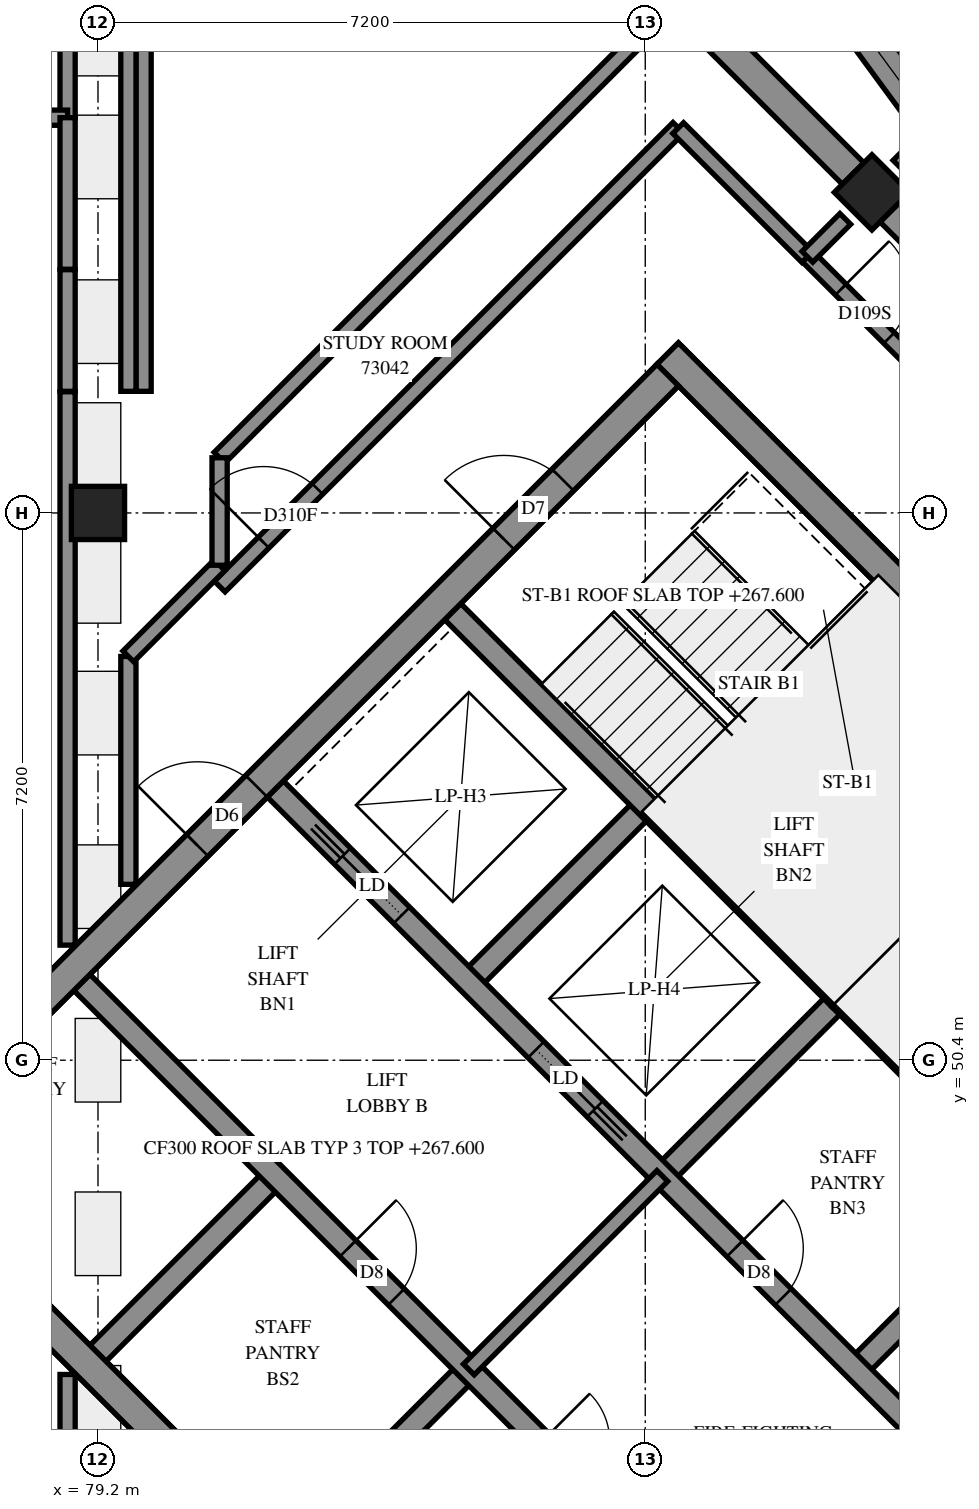
"""IFC4 building model, lengths in metres.
Left out: names, types, materials, properties, quantities, classifications, styles, units other than length and angle.
Written with IfcOpenShell. Run it as: python <this file> out.ifc"""

import sys

from ifc_helpers import new_model, si_unit, direction, frame, frame_2d, origin, origin_2d, place, context, subcontext, project, spatial, polyline, rectangle, outline, extrude, element, fill, save


model = new_model("IFC4")
c1 = context("Model", 3, precision=1e-05, world=origin(), true_north=direction((0.0, 1.0)))
c2 = subcontext(c1, "Body", "Model", "MODEL_VIEW")
j1 = project(units=[si_unit("LENGTHUNIT", "METRE"), si_unit("PLANEANGLEUNIT", "RADIAN")], contexts=[c1])
p1 = place(None, origin())
s1 = spatial("IfcSite", under=j1, at=p1, CompositionType="ELEMENT")
p2 = place(p1, origin())
s2 = spatial("IfcBuilding", under=s1, at=p2, CompositionType="ELEMENT")
p3 = place(p2, frame((0.0, 0.0, 267.6)))
s3 = spatial("IfcBuildingStorey", under=s2, at=p3, CompositionType="ELEMENT", Elevation=267.6)
for number, where, z_axis, x_axis in (
    (1, (79.2, 57.6, 0.0), (0.0, 0.0, 1.0), (1.0, 0.0, 0.0)),
    (2, (89.382, 61.818, 0.0), (0.0, 0.0, 1.0), (0.707, -0.707, 0.0)),
):
    element("IfcColumn", number, at=place(p3, frame(where, z_axis=z_axis, x_axis=x_axis)), inside=s3, PredefinedType="COLUMN", context=c2, shape_type="SweptSolid", body=[
        extrude(rectangle(XDim=0.7, YDim=0.7, at=origin_2d()), origin(), (0.0, 0.0, 1.0), 3.1),
    ])
p4 = place(p3, frame((76.23, 49.231, -0.3), z_axis=(0.0, 0.0, 1.0), x_axis=(0.7071034917, -0.7071100706, 0.0)))
e3 = element("IfcWall", 3, at=p4, inside=s3, PredefinedType="SHEAR", context=c2, shape_type="SweptSolid", body=[
    extrude(rectangle(XDim=15.2, YDim=0.4, at=frame_2d((7.6, 0.0))), origin(), (0.0, 0.0, 1.0), 2.7),
])
p5 = place(p3, frame((86.695, 59.696, -0.3), z_axis=(0.0, 0.0, 1.0), x_axis=(0.7071100706, -0.7071034917, 0.0)))
e4 = element("IfcWall", 4, at=p5, inside=s3, PredefinedType="SHEAR", context=c2, shape_type="SweptSolid", body=[
    extrude(rectangle(XDim=15.2, YDim=0.4, at=frame_2d((7.6, 0.0))), origin(), (0.0, 0.0, 1.0), 2.7),
])
p6 = place(p5, frame((10.4, 0.0, 0.3)))
e5 = element("IfcOpeningElement", 5, at=p6, cuts=e4, PredefinedType="OPENING", context=c2, shape_type="SweptSolid", body=[
    extrude(rectangle(XDim=0.8, YDim=2.1, at=frame_2d((0.4, 1.05))), frame((0.0, 0.21, 0.0), z_axis=(0.0, -1.0, 0.0), x_axis=(1.0, 0.0, 0.0)), (0.0, 0.0, 1.0), 0.42),
])
p7 = place(p3, frame((76.513, 49.231, -0.3), z_axis=(0.0, 0.0, 1.0), x_axis=(0.7071067812, 0.7071067812, 0.0)))
e6 = element("IfcWall", 6, at=p7, inside=s3, PredefinedType="SHEAR", context=c2, shape_type="SweptSolid", body=[
    extrude(rectangle(XDim=14.4, YDim=0.4, at=frame_2d((7.2, 0.0))), origin(), (0.0, 0.0, 1.0), 2.7),
])
p8 = place(p7, frame((5.65, 0.0, 0.3)))
e7 = element("IfcOpeningElement", 7, at=p8, cuts=e6, PredefinedType="OPENING", context=c2, shape_type="SweptSolid", body=[
    extrude(rectangle(XDim=1.1, YDim=2.1, at=frame_2d((0.55, 1.05))), frame((0.0, 0.21, 0.0), z_axis=(0.0, -1.0, 0.0), x_axis=(1.0, 0.0, 0.0)), (0.0, 0.0, 1.0), 0.42),
])
p9 = place(p7, frame((11.35, 0.0, 0.3)))
e8 = element("IfcOpeningElement", 8, at=p9, cuts=e6, PredefinedType="OPENING", context=c2, shape_type="SweptSolid", body=[
    extrude(rectangle(XDim=1.1, YDim=2.1, at=frame_2d((0.55, 1.05))), frame((0.0, 0.21, 0.0), z_axis=(0.0, -1.0, 0.0), x_axis=(1.0, 0.0, 0.0)), (0.0, 0.0, 1.0), 0.42),
])
p10 = place(p7, frame((0.25, 0.0, 0.0)))
e9 = element("IfcOpeningElement", 9, at=p10, cuts=e6, PredefinedType="OPENING", context=c2, shape_type="SweptSolid", body=[
    extrude(rectangle(XDim=0.9, YDim=2.1, at=frame_2d((0.45, 1.05))), frame((0.0, 0.21, 0.0), z_axis=(0.0, -1.0, 0.0), x_axis=(1.0, 0.0, 0.0)), (0.0, 0.0, 1.0), 0.42),
])
p11 = place(p3, frame((86.978, 38.766, -0.3), z_axis=(0.0, 0.0, 1.0), x_axis=(0.7071067812, 0.7071067812, 0.0)))
e10 = element("IfcWall", 10, at=p11, inside=s3, PredefinedType="SHEAR", context=c2, shape_type="SweptSolid", body=[
    extrude(rectangle(XDim=14.4, YDim=0.4, at=frame_2d((7.2, 0.0))), origin(), (0.0, 0.0, 1.0), 2.7),
])
p12 = place(p11, frame((4.55, 0.0, 0.3)))
e11 = element("IfcOpeningElement", 11, at=p12, cuts=e10, PredefinedType="OPENING", context=c2, shape_type="SweptSolid", body=[
    extrude(rectangle(XDim=1.1, YDim=2.1, at=frame_2d((0.55, 1.05))), frame((0.0, 0.21, 0.0), z_axis=(0.0, -1.0, 0.0), x_axis=(1.0, 0.0, 0.0)), (0.0, 0.0, 1.0), 0.42),
])
p13 = place(p11, frame((11.35, 0.0, 0.3)))
e12 = element("IfcOpeningElement", 12, at=p13, cuts=e10, PredefinedType="OPENING", context=c2, shape_type="SweptSolid", body=[
    extrude(rectangle(XDim=1.1, YDim=2.1, at=frame_2d((0.55, 1.05))), frame((0.0, 0.21, 0.0), z_axis=(0.0, -1.0, 0.0), x_axis=(1.0, 0.0, 0.0)), (0.0, 0.0, 1.0), 0.42),
])
for number, where, z_axis, x_axis in (
    (13, (79.2, 46.544, 0.0), (0.0, 0.0, 1.0), (0.707, 0.707, 0.0)),
    (14, (84.079, 51.423, 0.0), (0.0, 0.0, 1.0), (0.707, 0.707, 0.0)),
):
    element("IfcWall", number, at=place(p3, frame(where, z_axis=z_axis, x_axis=x_axis)), inside=s3, PredefinedType="SOLIDWALL", context=c2, shape_type="SweptSolid", body=[
        extrude(rectangle(XDim=3.3, YDim=0.3, at=frame_2d((1.65, 0.0))), origin(), (0.0, 0.0, 1.0), 3.1),
    ])
p14 = place(p3, frame((81.746, 43.999, 0.0), z_axis=(0.0, 0.0, 1.0), x_axis=(0.7071067812, 0.7071067812, 0.0)))
e15 = element("IfcWall", 15, at=p14, inside=s3, PredefinedType="SOLIDWALL", context=c2, shape_type="SweptSolid", body=[
    extrude(rectangle(XDim=3.3, YDim=0.3, at=frame_2d((1.65, 0.0))), origin(), (0.0, 0.0, 1.0), 3.1),
])
for number, where, z_axis, x_axis in (
    (16, (86.625, 48.878, 0.0), (0.0, 0.0, 1.0), (0.707, 0.707, 0.0)),
    (17, (89.17, 46.332, 0.0), (0.0, 0.0, 1.0), (0.707, 0.707, 0.0)),
):
    element("IfcWall", number, at=place(p3, frame(where, z_axis=z_axis, x_axis=x_axis)), inside=s3, PredefinedType="SOLIDWALL", context=c2, shape_type="SweptSolid", body=[
        extrude(rectangle(XDim=3.3, YDim=0.3, at=frame_2d((1.65, 0.0))), origin(), (0.0, 0.0, 1.0), 3.1),
    ])
p15 = place(p3, frame((78.988, 51.423, 0.0), z_axis=(0.0, 0.0, 1.0), x_axis=(0.7071067812, -0.7071067812, 0.0)))
e18 = element("IfcWall", 18, at=p15, inside=s3, PredefinedType="SOLIDWALL", context=c2, shape_type="SweptSolid", body=[
    extrude(rectangle(XDim=14.4, YDim=0.3, at=frame_2d((7.2, 0.0))), origin(), (0.0, 0.0, 1.0), 3.1),
])
p16 = place(p15, frame((4.95, 0.0, 0.0)))
e19 = element("IfcOpeningElement", 19, at=p16, cuts=e18, PredefinedType="OPENING", context=c2, shape_type="SweptSolid", body=[
    extrude(rectangle(XDim=0.9, YDim=2.1, at=frame_2d((0.45, 1.05))), frame((0.0, 0.16, 0.0), z_axis=(0.0, -1.0, 0.0), x_axis=(1.0, 0.0, 0.0)), (0.0, 0.0, 1.0), 0.32),
])
p17 = place(p15, frame((8.55, 0.0, 0.0)))
e20 = element("IfcOpeningElement", 20, at=p17, cuts=e18, PredefinedType="OPENING", context=c2, shape_type="SweptSolid", body=[
    extrude(rectangle(XDim=0.9, YDim=2.1, at=frame_2d((0.45, 1.05))), frame((0.0, 0.16, 0.0), z_axis=(0.0, -1.0, 0.0), x_axis=(1.0, 0.0, 0.0)), (0.0, 0.0, 1.0), 0.32),
])
p18 = place(p15, frame((12.05, 0.0, 0.0)))
e21 = element("IfcOpeningElement", 21, at=p18, cuts=e18, PredefinedType="OPENING", context=c2, shape_type="SweptSolid", body=[
    extrude(rectangle(XDim=1.1, YDim=2.1, at=frame_2d((0.55, 1.05))), frame((0.0, 0.16, 0.0), z_axis=(0.0, -1.0, 0.0), x_axis=(1.0, 0.0, 0.0)), (0.0, 0.0, 1.0), 0.32),
])
p19 = place(p3, frame((81.534, 53.969, 0.0), z_axis=(0.0, 0.0, 1.0), x_axis=(0.707103309, -0.7071102534, 0.0)))
e22 = element("IfcWall", 22, at=p19, inside=s3, PredefinedType="SOLIDWALL", context=c2, shape_type="SweptSolid", body=[
    extrude(rectangle(XDim=14.4, YDim=0.3, at=frame_2d((7.2, 0.0))), origin(), (0.0, 0.0, 1.0), 3.1),
])
p20 = place(p19, frame((8.55, 0.0, 0.0)))
e23 = element("IfcOpeningElement", 23, at=p20, cuts=e22, PredefinedType="OPENING", context=c2, shape_type="SweptSolid", body=[
    extrude(rectangle(XDim=0.9, YDim=2.1, at=frame_2d((0.45, 1.05))), frame((0.0, 0.16, 0.0), z_axis=(0.0, -1.0, 0.0), x_axis=(1.0, 0.0, 0.0)), (0.0, 0.0, 1.0), 0.32),
])
p21 = place(p19, frame((1.25, 0.0, 0.0)))
e24 = element("IfcOpeningElement", 24, at=p21, cuts=e22, PredefinedType="OPENING", context=c2, shape_type="SweptSolid", body=[
    extrude(rectangle(XDim=1.1, YDim=2.1, at=frame_2d((0.55, 1.05))), frame((0.0, 0.16, 0.0), z_axis=(0.0, -1.0, 0.0), x_axis=(1.0, 0.0, 0.0)), (0.0, 0.0, 1.0), 0.32),
])
p22 = place(p19, frame((4.85, 0.0, 0.0)))
e25 = element("IfcOpeningElement", 25, at=p22, cuts=e22, PredefinedType="OPENING", context=c2, shape_type="SweptSolid", body=[
    extrude(rectangle(XDim=1.1, YDim=2.1, at=frame_2d((0.55, 1.05))), frame((0.0, 0.16, 0.0), z_axis=(0.0, -1.0, 0.0), x_axis=(1.0, 0.0, 0.0)), (0.0, 0.0, 1.0), 0.32),
])
p23 = place(p19, frame((12.05, 0.0, 0.0)))
e26 = element("IfcOpeningElement", 26, at=p23, cuts=e22, PredefinedType="OPENING", context=c2, shape_type="SweptSolid", body=[
    extrude(rectangle(XDim=1.1, YDim=2.1, at=frame_2d((0.55, 1.05))), frame((0.0, 0.16, 0.0), z_axis=(0.0, -1.0, 0.0), x_axis=(1.0, 0.0, 0.0)), (0.0, 0.0, 1.0), 0.32),
])
for number, where, z_axis, x_axis in (
    (27, (83.867, 56.302, 0.0), (0.0, 0.0, 1.0), (0.707, -0.707, 0.0)),
    (28, (88.958, 51.211, 0.0), (0.0, 0.0, 1.0), (0.707, -0.707, 0.0)),
):
    element("IfcWall", number, at=place(p3, frame(where, z_axis=z_axis, x_axis=x_axis)), inside=s3, PredefinedType="SOLIDWALL", context=c2, shape_type="SweptSolid", body=[
        extrude(rectangle(XDim=7.2, YDim=0.3, at=frame_2d((3.6, 0.0))), origin(), (0.0, 0.0, 1.0), 3.1),
    ])
p24 = place(p3, frame((88.958, 51.211, 0.0), z_axis=(0.0, 0.0, 1.0), x_axis=(0.7071067812, 0.7071067812, 0.0)))
e29 = element("IfcWall", 29, at=p24, inside=s3, PredefinedType="SOLIDWALL", context=c2, shape_type="SweptSolid", body=[
    extrude(rectangle(XDim=4.2, YDim=0.3, at=frame_2d((2.1, 0.0))), origin(), (0.0, 0.0, 1.0), 3.1),
])
p25 = place(p3, frame((91.004, 61.571, 0.0), z_axis=(0.0, 0.0, 1.0), x_axis=(-0.5916423825, 0.806200528, 0.0)))
e30 = element("IfcWall", 30, at=p25, inside=s3, PredefinedType="SOLIDWALL", context=c2, shape_type="SweptSolid", body=[
    extrude(outline(polyline([(0.035, -0.225), (3.409, -0.225), (3.34, 0.225), (-0.035, 0.225), (0.035, -0.225)])), origin(), (0.0, 0.0, 1.0), 3.1),
])
p26 = place(p25, frame((1.639, 0.0, 0.45)))
e31 = element("IfcOpeningElement", 31, at=p26, cuts=e30, PredefinedType="OPENING", context=c2, shape_type="SweptSolid", body=[
    extrude(rectangle(XDim=1.2, YDim=2.55, at=frame_2d((0.6, 1.275))), frame((0.0, 0.235, 0.0), z_axis=(0.0, -1.0, 0.0), x_axis=(1.0, 0.0, 0.0)), (0.0, 0.0, 1.0), 0.47),
])
p27 = place(p3, frame((84.079, 46.332, 0.0), z_axis=(0.0, 0.0, 1.0), x_axis=(0.7071067812, 0.7071067812, 0.0)))
e32 = element("IfcWall", 32, at=p27, inside=s3, PredefinedType="PARTITIONING", context=c2, shape_type="SweptSolid", body=[
    extrude(rectangle(XDim=3.6, YDim=0.2, at=frame_2d((1.8, 0.0))), origin(), (0.0, 0.0, 1.0), 3.1),
])
p28 = place(p3, frame((79.8, 59.2, 0.0), z_axis=(0.0, 0.0, 1.0), x_axis=(0.0, 1.0, 0.0)))
e33 = element("IfcWall", 33, at=p28, inside=s3, PredefinedType="PARTITIONING", context=c2, shape_type="SweptSolid", body=[
    extrude(rectangle(XDim=13.8, YDim=0.2, at=frame_2d((6.9, 0.0))), origin(), (0.0, 0.0, 1.0), 3.1),
])
p29 = place(p3, frame((79.6, 59.2, 0.0), z_axis=(0.0, 0.0, 1.0), x_axis=(0.0, 1.0, 0.0)))
e34 = element("IfcWall", 34, at=p29, inside=s3, PredefinedType="PARTITIONING", context=c2, shape_type="SweptSolid", body=[
    extrude(rectangle(XDim=12.8, YDim=0.2, at=frame_2d((6.4, 0.0))), origin(), (0.0, 0.0, 1.0), 3.1),
])
p30 = place(p3, frame((80.799, 58.327, 0.0), z_axis=(0.0, 0.0, 1.0), x_axis=(0.7071120163, 0.707101546, 0.0)))
e35 = element("IfcWall", 35, at=p30, inside=s3, PredefinedType="PARTITIONING", context=c2, shape_type="SweptSolid", body=[
    extrude(rectangle(XDim=9.551, YDim=0.2, at=frame_2d((4.775, 0.0))), origin(), (0.0, 0.0, 1.0), 3.1),
])
p31 = place(p3, frame((78.8, 62.8, 0.0), z_axis=(0.0, 0.0, 1.0), x_axis=(0.0, 1.0, 0.0)))
e36 = element("IfcWall", 36, at=p31, inside=s3, PredefinedType="PARTITIONING", context=c2, shape_type="SweptSolid", body=[
    extrude(rectangle(XDim=9.2, YDim=0.2, at=frame_2d((4.6, 0.0))), origin(), (0.0, 0.0, 1.0), 3.1),
])
p32 = place(p3, frame((80.802, 56.633, 0.0), z_axis=(0.0, 0.0, 1.0), x_axis=(0.7071067812, 0.7071067812, 0.0)))
e37 = element("IfcWall", 37, at=p32, inside=s3, PredefinedType="PARTITIONING", context=c2, shape_type="SweptSolid", body=[
    extrude(rectangle(XDim=8.533, YDim=0.2, at=frame_2d((4.267, 0.0))), origin(), (0.0, 0.0, 1.0), 3.1),
])
p33 = place(p32, frame((0.817, 0.0, 0.0)))
e38 = element("IfcOpeningElement", 38, at=p33, cuts=e37, PredefinedType="OPENING", context=c2, shape_type="SweptSolid", body=[
    extrude(rectangle(XDim=1.0, YDim=2.1, at=frame_2d((0.5, 1.05))), frame((0.0, 0.11, 0.0), z_axis=(0.0, -1.0, 0.0), x_axis=(1.0, 0.0, 0.0)), (0.0, 0.0, 1.0), 0.22),
])
p34 = place(p3, frame((78.8, 51.914, 0.0), z_axis=(0.0, 0.0, 1.0), x_axis=(0.0, 1.0, 0.0)))
e39 = element("IfcWall", 39, at=p34, inside=s3, PredefinedType="PARTITIONING", context=c2, shape_type="SweptSolid", body=[
    extrude(rectangle(XDim=7.28, YDim=0.2, at=frame_2d((3.64, 0.0))), origin(), (0.0, 0.0, 1.0), 3.1),
])
p35 = place(p3, frame((88.537, 60.973, 0.0), z_axis=(0.0, 0.0, 1.0), x_axis=(0.7071067812, -0.7071067812, 0.0)))
e40 = element("IfcWall", 40, at=p35, inside=s3, PredefinedType="PARTITIONING", context=c2, shape_type="SweptSolid", body=[
    extrude(rectangle(XDim=6.401, YDim=0.2, at=frame_2d((3.2, 0.0))), origin(), (0.0, 0.0, 1.0), 3.1),
])
p36 = place(p35, frame((0.615, 0.0, 0.0)))
e41 = element("IfcOpeningElement", 41, at=p36, cuts=e40, PredefinedType="OPENING", context=c2, shape_type="SweptSolid", body=[
    extrude(rectangle(XDim=0.9, YDim=2.1, at=frame_2d((0.45, 1.05))), frame((0.0, 0.11, 0.0), z_axis=(0.0, -1.0, 0.0), x_axis=(1.0, 0.0, 0.0)), (0.0, 0.0, 1.0), 0.22),
])
p37 = place(p3, frame((74.402, 62.8, 0.0), z_axis=(0.0, 0.0, 1.0), x_axis=(1.0, 0.0, 0.0)))
e42 = element("IfcWall", 42, at=p37, inside=s3, PredefinedType="PARTITIONING", context=c2, shape_type="SweptSolid", body=[
    extrude(rectangle(XDim=4.398, YDim=0.2, at=frame_2d((2.199, 0.0))), origin(), (0.0, 0.0, 1.0), 3.1),
])
p38 = place(p37, frame((1.94, 0.0, 0.0)))
e43 = element("IfcOpeningElement", 43, at=p38, cuts=e42, PredefinedType="OPENING", context=c2, shape_type="SweptSolid", body=[
    extrude(rectangle(XDim=1.0, YDim=2.1, at=frame_2d((0.5, 1.05))), frame((0.0, 0.11, 0.0), z_axis=(0.0, -1.0, 0.0), x_axis=(1.0, 0.0, 0.0)), (0.0, 0.0, 1.0), 0.22),
])
p39 = place(p3, frame((79.6, 52.714, 0.0), z_axis=(0.0, 0.0, 1.0), x_axis=(0.0, 1.0, 0.0)))
e44 = element("IfcWall", 44, at=p39, inside=s3, PredefinedType="PARTITIONING", context=c2, shape_type="SweptSolid", body=[
    extrude(rectangle(XDim=2.998, YDim=0.2, at=frame_2d((1.499, 0.0))), origin(), (0.0, 0.0, 1.0), 3.1),
])
p40 = place(p3, frame((86.833, 62.663, 0.0), z_axis=(0.0, 0.0, 1.0), x_axis=(0.7075233388, -0.706689978, 0.0)))
e45 = element("IfcWall", 45, at=p40, inside=s3, PredefinedType="PARTITIONING", context=c2, shape_type="SweptSolid", body=[
    extrude(rectangle(XDim=2.4, YDim=0.2, at=frame_2d((1.2, 0.0))), origin(), (0.0, 0.0, 1.0), 3.1),
])
p41 = place(p3, frame((78.8, 60.806, 0.0), z_axis=(0.0, 0.0, 1.0), x_axis=(0.0, 1.0, 0.0)))
e46 = element("IfcWall", 46, at=p41, inside=s3, PredefinedType="PARTITIONING", context=c2, shape_type="SweptSolid", body=[
    extrude(rectangle(XDim=1.994, YDim=0.2, at=frame_2d((0.997, 0.0))), origin(), (0.0, 0.0, 1.0), 3.1),
])
p42 = place(p3, frame((78.8, 44.45, 0.0), z_axis=(0.0, 0.0, 1.0), x_axis=(0.0, 1.0, 0.0)))
e47 = element("IfcWall", 47, at=p42, inside=s3, PredefinedType="PARTITIONING", context=c2, shape_type="SweptSolid", body=[
    extrude(rectangle(XDim=1.816, YDim=0.2, at=frame_2d((0.908, 0.0))), origin(), (0.0, 0.0, 1.0), 3.1),
])
p43 = place(p3, frame((79.599, 55.713, 0.0), z_axis=(0.0, 0.0, 1.0), x_axis=(0.7071067812, 0.7071067812, 0.0)))
e48 = element("IfcWall", 48, at=p43, inside=s3, PredefinedType="PARTITIONING", context=c2, shape_type="SweptSolid", body=[
    extrude(rectangle(XDim=1.697, YDim=0.2, at=frame_2d((0.849, 0.0))), origin(), (0.0, 0.0, 1.0), 3.1),
])
p44 = place(p3, frame((78.8, 59.2, 0.0), z_axis=(0.0, 0.0, 1.0), x_axis=(0.0, 1.0, 0.0)))
e49 = element("IfcWall", 49, at=p44, inside=s3, PredefinedType="PARTITIONING", context=c2, shape_type="SweptSolid", body=[
    extrude(rectangle(XDim=1.6, YDim=0.2, at=frame_2d((0.8, 0.0))), origin(), (0.0, 0.0, 1.0), 3.1),
])
p45 = place(p3, frame((80.8, 56.912, 0.0), z_axis=(0.0, 0.0, 1.0), x_axis=(0.0, 1.0, 0.0)))
e50 = element("IfcWall", 50, at=p45, inside=s3, PredefinedType="PARTITIONING", context=c2, shape_type="SweptSolid", body=[
    extrude(rectangle(XDim=1.414, YDim=0.2, at=frame_2d((0.707, 0.0))), origin(), (0.0, 0.0, 1.0), 3.1),
])
p46 = place(p3, frame((88.534, 60.971, 0.0), z_axis=(0.0, 0.0, 1.0), x_axis=(0.7071067812, 0.7071067812, 0.0)))
e51 = element("IfcWall", 51, at=p46, inside=s3, PredefinedType="PARTITIONING", context=c2, shape_type="SweptSolid", body=[
    extrude(rectangle(XDim=0.704, YDim=0.2, at=frame_2d((0.352, 0.0))), origin(), (0.0, 0.0, 1.0), 3.1),
])
p47 = place(p3, frame((89.731, 62.169, 0.0), z_axis=(0.0, 0.0, 1.0), x_axis=(0.7072172062, 0.7069963389, 0.0)))
e52 = element("IfcWall", 52, at=p47, inside=s3, PredefinedType="PARTITIONING", context=c2, shape_type="SweptSolid", body=[
    extrude(rectangle(XDim=0.453, YDim=0.2, at=frame_2d((0.226, 0.0))), origin(), (0.0, 0.0, 1.0), 3.1),
])
p48 = place(p26, origin())
e53 = element("IfcWindow", 53, at=p48, inside=s3, PartitioningType="SINGLE_PANEL", PredefinedType="WINDOW", context=c2, shape_type="SweptSolid", body=[
    extrude(rectangle(XDim=1.2, YDim=2.55, at=frame_2d((0.6, 1.275))), frame((0.0, 0.205, 0.0), z_axis=(0.0, -1.0, 0.0), x_axis=(1.0, 0.0, 0.0)), (0.0, 0.0, 1.0), 0.06),
])
fill(e31, e53)
p49 = place(p8, origin())
e54 = element("IfcDoor", 54, at=p49, inside=s3, OperationType="DOUBLE_DOOR_SINGLE_SWING", PredefinedType="DOOR", context=c2, shape_type="SweptSolid", body=[
    extrude(rectangle(XDim=1.1, YDim=2.1, at=frame_2d((0.55, 1.05))), frame((0.0, 0.025, 0.0), z_axis=(0.0, -1.0, 0.0), x_axis=(1.0, 0.0, 0.0)), (0.0, 0.0, 1.0), 0.05),
])
fill(e7, e54)
p50 = place(p9, origin())
e55 = element("IfcDoor", 55, at=p50, inside=s3, OperationType="SINGLE_SWING_LEFT", PredefinedType="DOOR", context=c2, shape_type="SweptSolid", body=[
    extrude(rectangle(XDim=1.1, YDim=2.1, at=frame_2d((0.55, 1.05))), frame((0.0, 0.025, 0.0), z_axis=(0.0, -1.0, 0.0), x_axis=(1.0, 0.0, 0.0)), (0.0, 0.0, 1.0), 0.05),
])
fill(e8, e55)
p51 = place(p16, origin())
e56 = element("IfcDoor", 56, at=p51, inside=s3, OperationType="SINGLE_SWING_LEFT", PredefinedType="DOOR", context=c2, shape_type="SweptSolid", body=[
    extrude(rectangle(XDim=0.9, YDim=2.1, at=frame_2d((0.45, 1.05))), frame((0.0, 0.025, 0.0), z_axis=(0.0, -1.0, 0.0), x_axis=(1.0, 0.0, 0.0)), (0.0, 0.0, 1.0), 0.05),
])
fill(e19, e56)
p52 = place(p20, origin())
e57 = element("IfcDoor", 57, at=p52, inside=s3, OperationType="SINGLE_SWING_LEFT", PredefinedType="DOOR", context=c2, shape_type="SweptSolid", body=[
    extrude(rectangle(XDim=0.9, YDim=2.1, at=frame_2d((0.45, 1.05))), frame((0.0, 0.025, 0.0), z_axis=(0.0, -1.0, 0.0), x_axis=(1.0, 0.0, 0.0)), (0.0, 0.0, 1.0), 0.05),
])
fill(e23, e57)
p53 = place(p21, origin())
e58 = element("IfcDoor", 58, at=p53, inside=s3, OperationType="SLIDING_TO_LEFT", PredefinedType="DOOR", context=c2, shape_type="SweptSolid", body=[
    extrude(rectangle(XDim=1.1, YDim=2.1, at=frame_2d((0.55, 1.05))), frame((0.0, 0.025, 0.0), z_axis=(0.0, -1.0, 0.0), x_axis=(1.0, 0.0, 0.0)), (0.0, 0.0, 1.0), 0.05),
])
fill(e24, e58)
p54 = place(p22, origin())
e59 = element("IfcDoor", 59, at=p54, inside=s3, OperationType="SLIDING_TO_RIGHT", PredefinedType="DOOR", context=c2, shape_type="SweptSolid", body=[
    extrude(rectangle(XDim=1.1, YDim=2.1, at=frame_2d((0.55, 1.05))), frame((0.0, 0.025, 0.0), z_axis=(0.0, -1.0, 0.0), x_axis=(1.0, 0.0, 0.0)), (0.0, 0.0, 1.0), 0.05),
])
fill(e25, e59)
p55 = place(p33, origin())
e60 = element("IfcDoor", 60, at=p55, inside=s3, OperationType="SINGLE_SWING_RIGHT", PredefinedType="DOOR", context=c2, shape_type="SweptSolid", body=[
    extrude(rectangle(XDim=1.0, YDim=2.1, at=frame_2d((0.5, 1.05))), frame((0.0, 0.025, 0.0), z_axis=(0.0, -1.0, 0.0), x_axis=(1.0, 0.0, 0.0)), (0.0, 0.0, 1.0), 0.05),
])
fill(e38, e60)
p56 = place(p36, origin())
e61 = element("IfcDoor", 61, at=p56, inside=s3, OperationType="SINGLE_SWING_LEFT", PredefinedType="DOOR", context=c2, shape_type="SweptSolid", body=[
    extrude(rectangle(XDim=0.9, YDim=2.1, at=frame_2d((0.45, 1.05))), frame((0.0, 0.025, 0.0), z_axis=(0.0, -1.0, 0.0), x_axis=(1.0, 0.0, 0.0)), (0.0, 0.0, 1.0), 0.05),
])
fill(e41, e61)
save(model, sys.argv[1])
